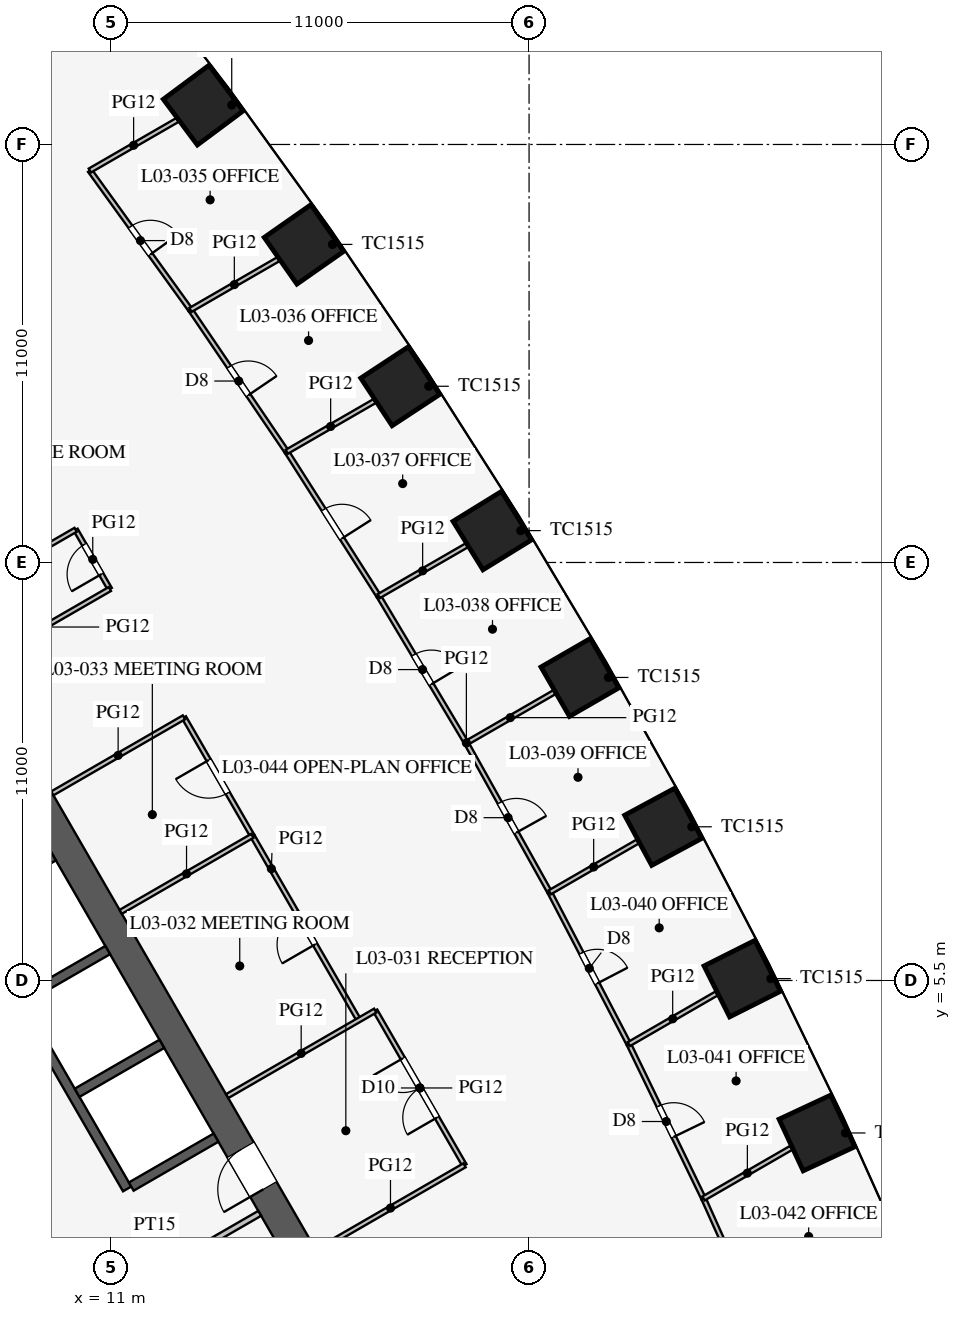
"""IFC4 building model, lengths in metres.
Left out: names, types, materials, properties, quantities, classifications, styles, units other than length and angle.
Written with IfcOpenShell. Run it as: python <this file> out.ifc"""

import sys

from ifc_helpers import new_model, si_unit, direction, frame, frame_2d, origin, origin_2d, place, context, subcontext, project, spatial, rectangle, extrude, element, fill, save


model = new_model("IFC4")
c1 = context("Model", 3, precision=1e-05, world=origin(), true_north=direction((0.0, 1.0)))
c2 = subcontext(c1, "Body", "Model", "MODEL_VIEW")
j1 = project(units=[si_unit("LENGTHUNIT", "METRE"), si_unit("PLANEANGLEUNIT", "RADIAN")], contexts=[c1])
p1 = place(None, origin())
s1 = spatial("IfcSite", under=j1, at=p1, CompositionType="ELEMENT")
p2 = place(p1, origin())
s2 = spatial("IfcBuilding", under=s1, at=p2, CompositionType="ELEMENT")
p3 = place(p2, frame((0.0, 0.0, 16.5)))
s3 = spatial("IfcBuildingStorey", under=s2, at=p3, CompositionType="ELEMENT", Elevation=16.5)
for number, where, z_axis, x_axis in (
    (1, (29.576, 1.487, 0.0), (0.0, 0.0, 1.0), (-0.423, 0.906, 0.0)),
    (2, (27.611, 5.549, 0.0), (0.0, 0.0, 1.0), (-0.449, 0.894, 0.0)),
    (3, (25.531, 9.544, 0.0), (0.0, 0.0, 1.0), (-0.475, 0.88, 0.0)),
    (4, (23.338, 13.474, 0.0), (0.0, 0.0, 1.0), (-0.5, 0.866, 0.0)),
    (5, (21.031, 17.339, 0.0), (0.0, 0.0, 1.0), (-0.525, 0.851, 0.0)),
    (6, (18.611, 21.137, 0.0), (0.0, 0.0, 1.0), (-0.549, 0.836, 0.0)),
    (7, (16.076, 24.87, 0.0), (0.0, 0.0, 1.0), (-0.574, 0.819, 0.0)),
    (8, (13.426, 28.536, 0.0), (0.0, 0.0, 1.0), (-0.597, 0.802, 0.0)),
):
    element("IfcColumn", number, at=place(p3, frame(where, z_axis=z_axis, x_axis=x_axis)), inside=s3, PredefinedType="COLUMN", context=c2, shape_type="SweptSolid", body=[
        extrude(rectangle(XDim=1.5, YDim=1.5, at=origin_2d()), origin(), (0.0, 0.0, 1.0), 4.2),
    ])
p4 = place(p3, frame((16.743, -3.0, 0.0), z_axis=(0.0, 0.0, 1.0), x_axis=(-0.500002442456, 0.866023993627, 0.0)))
e9 = element("IfcWall", 9, at=p4, inside=s3, PredefinedType="SHEAR", context=c2, shape_type="SweptSolid", body=[
    extrude(rectangle(XDim=21.939, YDim=0.8, at=frame_2d((10.97, 0.0))), origin(), (0.0, 0.0, 1.0), 4.2),
])
p5 = place(p4, frame((17.27, 0.0, 0.0)))
e10 = element("IfcOpeningElement", 10, at=p5, cuts=e9, PredefinedType="OPENING", context=c2, shape_type="SweptSolid", body=[
    extrude(rectangle(XDim=1.2, YDim=2.1, at=frame_2d((0.6, 1.05))), frame((0.0, 0.41, 0.0), z_axis=(0.0, -1.0, 0.0), x_axis=(1.0, 0.0, 0.0)), (0.0, 0.0, 1.0), 0.82),
])
p6 = place(p4, frame((3.47, 0.0, 0.0)))
e11 = element("IfcOpeningElement", 11, at=p6, cuts=e9, PredefinedType="OPENING", context=c2, shape_type="SweptSolid", body=[
    extrude(rectangle(XDim=1.2, YDim=2.1, at=frame_2d((0.6, 1.05))), frame((0.0, 0.41, 0.0), z_axis=(0.0, -1.0, 0.0), x_axis=(1.0, 0.0, 0.0)), (0.0, 0.0, 1.0), 0.82),
])
p7 = place(p3, frame((11.424, 0.014, 0.0), z_axis=(0.0, 0.0, 1.0), x_axis=(-0.500001763848, 0.866024385424, 0.0)))
e12 = element("IfcWall", 12, at=p7, inside=s3, PredefinedType="SHEAR", context=c2, shape_type="SweptSolid", body=[
    extrude(rectangle(XDim=11.4, YDim=0.25, at=frame_2d((5.7, 0.0))), origin(), (0.0, 0.0, 1.0), 4.2),
])
for number, where, z_axis, x_axis in (
    (13, (11.532, 0.076, 0.0), (0.0, 0.0, 1.0), (0.866, 0.5, 0.0)),
    (14, (10.107, 2.544, 0.0), (0.0, 0.0, 1.0), (0.866, 0.5, 0.0)),
    (15, (8.682, 5.012, 0.0), (0.0, 0.0, 1.0), (0.866, 0.5, 0.0)),
    (16, (7.257, 7.481, 0.0), (0.0, 0.0, 1.0), (0.866, 0.5, 0.0)),
):
    element("IfcWall", number, at=place(p3, frame(where, z_axis=z_axis, x_axis=x_axis)), inside=s3, PredefinedType="SHEAR", context=c2, shape_type="SweptSolid", body=[
        extrude(rectangle(XDim=2.575, YDim=0.25, at=frame_2d((1.288, 0.0))), origin(), (0.0, 0.0, 1.0), 4.2),
    ])
p8 = place(p3, frame((10.495, -3.178, 0.0), z_axis=(0.0, 0.0, 1.0), x_axis=(0.86602216432, 0.500005610874, 0.0)))
e17 = element("IfcWall", 17, at=p8, inside=s3, PredefinedType="PARTITIONING", context=c2, shape_type="SweptSolid", body=[
    extrude(rectangle(XDim=5.1, YDim=0.15, at=frame_2d((2.55, 0.0))), origin(), (0.0, 0.0, 1.0), 4.0),
])
p9 = place(p8, frame((2.6, 0.0, 0.0)))
e18 = element("IfcOpeningElement", 18, at=p9, cuts=e17, PredefinedType="OPENING", context=c2, shape_type="SweptSolid", body=[
    extrude(rectangle(XDim=0.9, YDim=2.1, at=frame_2d((0.45, 1.05))), frame((0.0, 0.085, 0.0), z_axis=(0.0, -1.0, 0.0), x_axis=(1.0, 0.0, 0.0)), (0.0, 0.0, 1.0), 0.17),
])
p10 = place(p3, frame((14.719, 9.306, 0.0), z_axis=(0.0, 0.0, 1.0), x_axis=(-0.499961193289, 0.866047807691, 0.0)))
e19 = element("IfcWall", 19, at=p10, inside=s3, PredefinedType="PARTITIONING", context=c2, shape_type="SweptSolid", body=[
    extrude(rectangle(XDim=3.6, YDim=0.12, at=frame_2d((1.8, 0.0))), origin(), (0.0, 0.0, 1.0), 2.9),
])
p11 = place(p10, frame((1.3, 0.0, 0.15)))
e20 = element("IfcOpeningElement", 20, at=p11, cuts=e19, PredefinedType="OPENING", context=c2, shape_type="SweptSolid", body=[
    extrude(rectangle(XDim=1.0, YDim=2.1, at=frame_2d((0.5, 1.05))), frame((0.0, 0.07, 0.0), z_axis=(0.0, -1.0, 0.0), x_axis=(1.0, 0.0, 0.0)), (0.0, 0.0, 1.0), 0.14),
])
p12 = place(p3, frame((10.969, 15.802, 0.0), z_axis=(0.0, 0.0, 1.0), x_axis=(-0.499961193289, 0.866047807691, 0.0)))
e21 = element("IfcWall", 21, at=p12, inside=s3, PredefinedType="PARTITIONING", context=c2, shape_type="SweptSolid", body=[
    extrude(rectangle(XDim=1.8, YDim=0.12, at=frame_2d((0.9, 0.0))), origin(), (0.0, 0.0, 1.0), 2.9),
])
p13 = place(p12, frame((0.45, 0.0, 0.15)))
e22 = element("IfcOpeningElement", 22, at=p13, cuts=e21, PredefinedType="OPENING", context=c2, shape_type="SweptSolid", body=[
    extrude(rectangle(XDim=0.9, YDim=2.1, at=frame_2d((0.45, 1.05))), frame((0.0, 0.07, 0.0), z_axis=(0.0, -1.0, 0.0), x_axis=(1.0, 0.0, 0.0)), (0.0, 0.0, 1.0), 0.14),
])
p14 = place(p3, frame((17.519, 4.457, 0.0), z_axis=(0.0, 0.0, 1.0), x_axis=(-0.500016814911, 0.866015695474, 0.0)))
e23 = element("IfcWall", 23, at=p14, inside=s3, PredefinedType="PARTITIONING", context=c2, shape_type="SweptSolid", body=[
    extrude(rectangle(XDim=5.6, YDim=0.12, at=frame_2d((2.8, 0.0))), origin(), (0.0, 0.0, 1.0), 2.9),
])
p15 = place(p14, frame((2.3, 0.0, 0.15)))
e24 = element("IfcOpeningElement", 24, at=p15, cuts=e23, PredefinedType="OPENING", context=c2, shape_type="SweptSolid", body=[
    extrude(rectangle(XDim=1.0, YDim=2.1, at=frame_2d((0.5, 1.05))), frame((0.0, 0.07, 0.0), z_axis=(0.0, -1.0, 0.0), x_axis=(1.0, 0.0, 0.0)), (0.0, 0.0, 1.0), 0.14),
])
p16 = place(p3, frame((20.302, 0.636, 0.0), z_axis=(0.0, 0.0, 1.0), x_axis=(-0.499977259774, 0.866038532462, 0.0)))
e25 = element("IfcWall", 25, at=p16, inside=s3, PredefinedType="PARTITIONING", context=c2, shape_type="SweptSolid", body=[
    extrude(rectangle(XDim=4.7, YDim=0.12, at=frame_2d((2.35, 0.0))), origin(), (0.0, 0.0, 1.0), 2.9),
])
p17 = place(p16, frame((1.45, 0.0, 0.15)))
e26 = element("IfcOpeningElement", 26, at=p17, cuts=e25, PredefinedType="OPENING", context=c2, shape_type="SweptSolid", body=[
    extrude(rectangle(XDim=1.8, YDim=2.1, at=frame_2d((0.9, 1.05))), frame((0.0, 0.07, 0.0), z_axis=(0.0, -1.0, 0.0), x_axis=(1.0, 0.0, 0.0)), (0.0, 0.0, 1.0), 0.14),
])
for number, where, z_axis, x_axis in (
    (27, (11.255, 7.306, 0.0), (0.0, 0.0, 1.0), (0.866, 0.5, 0.0)),
    (28, (6.605, 15.36, 0.0), (0.0, 0.0, 1.0), (0.866, 0.5, 0.0)),
    (29, (9.455, 10.424, 0.0), (0.0, 0.0, 1.0), (0.866, 0.5, 0.0)),
    (30, (7.505, 13.802, 0.0), (0.0, 0.0, 1.0), (0.866, 0.5, 0.0)),
):
    element("IfcWall", number, at=place(p3, frame(where, z_axis=z_axis, x_axis=x_axis)), inside=s3, PredefinedType="PARTITIONING", context=c2, shape_type="SweptSolid", body=[
        extrude(rectangle(XDim=4.0, YDim=0.12, at=frame_2d((2.0, 0.0))), origin(), (0.0, 0.0, 1.0), 2.9),
    ])
p18 = place(p3, frame((14.055, 2.457, 0.0), z_axis=(0.0, 0.0, 1.0), x_axis=(0.866031096941, 0.499990139034, 0.0)))
e31 = element("IfcWall", 31, at=p18, inside=s3, PredefinedType="PARTITIONING", context=c2, shape_type="SweptSolid", body=[
    extrude(rectangle(XDim=4.5, YDim=0.12, at=frame_2d((2.25, 0.0))), origin(), (0.0, 0.0, 1.0), 2.9),
])
p19 = place(p3, frame((16.405, -1.614, 0.0), z_axis=(0.0, 0.0, 1.0), x_axis=(0.866017533419, 0.500013631625, 0.0)))
e32 = element("IfcWall", 32, at=p19, inside=s3, PredefinedType="PARTITIONING", context=c2, shape_type="SweptSolid", body=[
    extrude(rectangle(XDim=4.5, YDim=0.12, at=frame_2d((2.25, 0.0))), origin(), (0.0, 0.0, 1.0), 2.9),
])
p20 = place(p3, frame((20.351, 11.749, 0.0), z_axis=(0.0, 0.0, 1.0), x_axis=(-0.51252396108, 0.858672923364, 0.0)))
e33 = element("IfcWall", 33, at=p20, inside=s3, PredefinedType="PARTITIONING", context=c2, shape_type="SweptSolid", body=[
    extrude(rectangle(XDim=4.5, YDim=0.12, at=frame_2d((2.25, 0.0))), origin(), (0.0, 0.0, 1.0), 2.9),
])
p21 = place(p20, frame((1.8, 0.0, 0.15)))
e34 = element("IfcOpeningElement", 34, at=p21, cuts=e33, PredefinedType="OPENING", context=c2, shape_type="SweptSolid", body=[
    extrude(rectangle(XDim=0.9, YDim=2.1, at=frame_2d((0.45, 1.05))), frame((0.0, 0.07, 0.0), z_axis=(0.0, -1.0, 0.0), x_axis=(1.0, 0.0, 0.0)), (0.0, 0.0, 1.0), 0.14),
])
p22 = place(p3, frame((13.091, 23.146, 0.0), z_axis=(0.0, 0.0, 1.0), x_axis=(-0.58534077607, 0.810787380187, 0.0)))
e35 = element("IfcWall", 35, at=p22, inside=s3, PredefinedType="PARTITIONING", context=c2, shape_type="SweptSolid", body=[
    extrude(rectangle(XDim=4.523, YDim=0.12, at=frame_2d((2.262, 0.0))), origin(), (0.0, 0.0, 1.0), 2.9),
])
p23 = place(p22, frame((1.8, 0.0, 0.15)))
e36 = element("IfcOpeningElement", 36, at=p23, cuts=e35, PredefinedType="OPENING", context=c2, shape_type="SweptSolid", body=[
    extrude(rectangle(XDim=0.9, YDim=2.1, at=frame_2d((0.45, 1.05))), frame((0.0, 0.07, 0.0), z_axis=(0.0, -1.0, 0.0), x_axis=(1.0, 0.0, 0.0)), (0.0, 0.0, 1.0), 0.14),
])
p24 = place(p3, frame((18.044, 15.614, 0.0), z_axis=(0.0, 0.0, 1.0), x_axis=(-0.537243691336, 0.843427066272, 0.0)))
e37 = element("IfcWall", 37, at=p24, inside=s3, PredefinedType="PARTITIONING", context=c2, shape_type="SweptSolid", body=[
    extrude(rectangle(XDim=4.504, YDim=0.12, at=frame_2d((2.252, 0.0))), origin(), (0.0, 0.0, 1.0), 2.9),
])
p25 = place(p24, frame((1.8, 0.0, 0.15)))
e38 = element("IfcOpeningElement", 38, at=p25, cuts=e37, PredefinedType="OPENING", context=c2, shape_type="SweptSolid", body=[
    extrude(rectangle(XDim=0.9, YDim=2.1, at=frame_2d((0.45, 1.05))), frame((0.0, 0.07, 0.0), z_axis=(0.0, -1.0, 0.0), x_axis=(1.0, 0.0, 0.0)), (0.0, 0.0, 1.0), 0.14),
])
p26 = place(p3, frame((15.624, 19.413, 0.0), z_axis=(0.0, 0.0, 1.0), x_axis=(-0.561512004239, 0.827468591002, 0.0)))
e39 = element("IfcWall", 39, at=p26, inside=s3, PredefinedType="PARTITIONING", context=c2, shape_type="SweptSolid", body=[
    extrude(rectangle(XDim=4.512, YDim=0.12, at=frame_2d((2.256, 0.0))), origin(), (0.0, 0.0, 1.0), 2.9),
])
p27 = place(p26, frame((1.8, 0.0, 0.15)))
e40 = element("IfcOpeningElement", 40, at=p27, cuts=e39, PredefinedType="OPENING", context=c2, shape_type="SweptSolid", body=[
    extrude(rectangle(XDim=0.9, YDim=2.1, at=frame_2d((0.45, 1.05))), frame((0.0, 0.07, 0.0), z_axis=(0.0, -1.0, 0.0), x_axis=(1.0, 0.0, 0.0)), (0.0, 0.0, 1.0), 0.14),
])
p28 = place(p3, frame((26.591, -0.236, 0.0), z_axis=(0.0, 0.0, 1.0), x_axis=(-0.435857917556, 0.900015486369, 0.0)))
e41 = element("IfcWall", 41, at=p28, inside=s3, PredefinedType="PARTITIONING", context=c2, shape_type="SweptSolid", body=[
    extrude(rectangle(XDim=4.512, YDim=0.12, at=frame_2d((2.256, 0.0))), origin(), (0.0, 0.0, 1.0), 2.9),
])
p29 = place(p28, frame((1.8, 0.0, 0.15)))
e42 = element("IfcOpeningElement", 42, at=p29, cuts=e41, PredefinedType="OPENING", context=c2, shape_type="SweptSolid", body=[
    extrude(rectangle(XDim=0.9, YDim=2.1, at=frame_2d((0.45, 1.05))), frame((0.0, 0.07, 0.0), z_axis=(0.0, -1.0, 0.0), x_axis=(1.0, 0.0, 0.0)), (0.0, 0.0, 1.0), 0.14),
])
p30 = place(p3, frame((28.443, -4.363, 0.0), z_axis=(0.0, 0.0, 1.0), x_axis=(-0.409495979977, 0.912311921649, 0.0)))
e43 = element("IfcWall", 43, at=p30, inside=s3, PredefinedType="PARTITIONING", context=c2, shape_type="SweptSolid", body=[
    extrude(rectangle(XDim=4.523, YDim=0.12, at=frame_2d((2.262, 0.0))), origin(), (0.0, 0.0, 1.0), 2.9),
])
p31 = place(p30, frame((1.8, 0.0, 0.15)))
e44 = element("IfcOpeningElement", 44, at=p31, cuts=e43, PredefinedType="OPENING", context=c2, shape_type="SweptSolid", body=[
    extrude(rectangle(XDim=0.9, YDim=2.1, at=frame_2d((0.45, 1.05))), frame((0.0, 0.07, 0.0), z_axis=(0.0, -1.0, 0.0), x_axis=(1.0, 0.0, 0.0)), (0.0, 0.0, 1.0), 0.14),
])
p32 = place(p3, frame((22.544, 7.82, 0.0), z_axis=(0.0, 0.0, 1.0), x_axis=(-0.487373854787, 0.873193406795, 0.0)))
e45 = element("IfcWall", 45, at=p32, inside=s3, PredefinedType="PARTITIONING", context=c2, shape_type="SweptSolid", body=[
    extrude(rectangle(XDim=4.5, YDim=0.12, at=frame_2d((2.25, 0.0))), origin(), (0.0, 0.0, 1.0), 2.9),
])
p33 = place(p32, frame((1.8, 0.0, 0.15)))
e46 = element("IfcOpeningElement", 46, at=p33, cuts=e45, PredefinedType="OPENING", context=c2, shape_type="SweptSolid", body=[
    extrude(rectangle(XDim=0.9, YDim=2.1, at=frame_2d((0.45, 1.05))), frame((0.0, 0.07, 0.0), z_axis=(0.0, -1.0, 0.0), x_axis=(1.0, 0.0, 0.0)), (0.0, 0.0, 1.0), 0.14),
])
p34 = place(p3, frame((24.624, 3.824, 0.0), z_axis=(0.0, 0.0, 1.0), x_axis=(-0.461810056307, 0.886978845235, 0.0)))
e47 = element("IfcWall", 47, at=p34, inside=s3, PredefinedType="PARTITIONING", context=c2, shape_type="SweptSolid", body=[
    extrude(rectangle(XDim=4.504, YDim=0.12, at=frame_2d((2.252, 0.0))), origin(), (0.0, 0.0, 1.0), 2.9),
])
p35 = place(p34, frame((1.8, 0.0, 0.15)))
e48 = element("IfcOpeningElement", 48, at=p35, cuts=e47, PredefinedType="OPENING", context=c2, shape_type="SweptSolid", body=[
    extrude(rectangle(XDim=0.9, YDim=2.1, at=frame_2d((0.45, 1.05))), frame((0.0, 0.07, 0.0), z_axis=(0.0, -1.0, 0.0), x_axis=(1.0, 0.0, 0.0)), (0.0, 0.0, 1.0), 0.14),
])
p36 = place(p3, frame((20.351, 11.749, 0.0), z_axis=(0.0, 0.0, 1.0), x_axis=(0.865989150234, 0.500062787734, 0.0)))
e49 = element("IfcWall", 49, at=p36, inside=s3, PredefinedType="PARTITIONING", context=c2, shape_type="SweptSolid", body=[
    extrude(rectangle(XDim=2.67, YDim=0.12, at=frame_2d((1.335, 0.0))), origin(), (0.0, 0.0, 1.0), 2.9),
])
p37 = place(p3, frame((13.091, 23.146, 0.0), z_axis=(0.0, 0.0, 1.0), x_axis=(0.866023818221, 0.500002746266, 0.0)))
e50 = element("IfcWall", 50, at=p37, inside=s3, PredefinedType="PARTITIONING", context=c2, shape_type="SweptSolid", body=[
    extrude(rectangle(XDim=2.664, YDim=0.12, at=frame_2d((1.332, 0.0))), origin(), (0.0, 0.0, 1.0), 2.9),
])
p38 = place(p3, frame((10.443, 26.814, 0.0), z_axis=(0.0, 0.0, 1.0), x_axis=(0.866031171652, 0.499990009627, 0.0)))
e51 = element("IfcWall", 51, at=p38, inside=s3, PredefinedType="PARTITIONING", context=c2, shape_type="SweptSolid", body=[
    extrude(rectangle(XDim=2.659, YDim=0.12, at=frame_2d((1.33, 0.0))), origin(), (0.0, 0.0, 1.0), 2.9),
])
p39 = place(p3, frame((18.044, 15.614, 0.0), z_axis=(0.0, 0.0, 1.0), x_axis=(0.866022619654, 0.500004822225, 0.0)))
e52 = element("IfcWall", 52, at=p39, inside=s3, PredefinedType="PARTITIONING", context=c2, shape_type="SweptSolid", body=[
    extrude(rectangle(XDim=2.669, YDim=0.12, at=frame_2d((1.335, 0.0))), origin(), (0.0, 0.0, 1.0), 2.9),
])
p40 = place(p3, frame((15.624, 19.413, 0.0), z_axis=(0.0, 0.0, 1.0), x_axis=(0.866020974757, 0.500007671222, 0.0)))
e53 = element("IfcWall", 53, at=p40, inside=s3, PredefinedType="PARTITIONING", context=c2, shape_type="SweptSolid", body=[
    extrude(rectangle(XDim=2.667, YDim=0.12, at=frame_2d((1.334, 0.0))), origin(), (0.0, 0.0, 1.0), 2.9),
])
p41 = place(p3, frame((26.591, -0.236, 0.0), z_axis=(0.0, 0.0, 1.0), x_axis=(0.866023818221, 0.500002746266, 0.0)))
e54 = element("IfcWall", 54, at=p41, inside=s3, PredefinedType="PARTITIONING", context=c2, shape_type="SweptSolid", body=[
    extrude(rectangle(XDim=2.664, YDim=0.12, at=frame_2d((1.332, 0.0))), origin(), (0.0, 0.0, 1.0), 2.9),
])
p42 = place(p3, frame((22.544, 7.82, 0.0), z_axis=(0.0, 0.0, 1.0), x_axis=(0.866022619654, 0.500004822225, 0.0)))
e55 = element("IfcWall", 55, at=p42, inside=s3, PredefinedType="PARTITIONING", context=c2, shape_type="SweptSolid", body=[
    extrude(rectangle(XDim=2.669, YDim=0.12, at=frame_2d((1.335, 0.0))), origin(), (0.0, 0.0, 1.0), 2.9),
])
p43 = place(p3, frame((24.624, 3.824, 0.0), z_axis=(0.0, 0.0, 1.0), x_axis=(0.866020974757, 0.500007671222, 0.0)))
e56 = element("IfcWall", 56, at=p43, inside=s3, PredefinedType="PARTITIONING", context=c2, shape_type="SweptSolid", body=[
    extrude(rectangle(XDim=2.667, YDim=0.12, at=frame_2d((1.334, 0.0))), origin(), (0.0, 0.0, 1.0), 2.9),
])
p44 = place(p6, origin())
e57 = element("IfcDoor", 57, at=p44, inside=s3, OperationType="SINGLE_SWING_LEFT", PredefinedType="DOOR", context=c2, shape_type="SweptSolid", body=[
    extrude(rectangle(XDim=1.2, YDim=2.1, at=frame_2d((0.6, 1.05))), frame((0.0, 0.025, 0.0), z_axis=(0.0, -1.0, 0.0), x_axis=(1.0, 0.0, 0.0)), (0.0, 0.0, 1.0), 0.05),
])
fill(e11, e57)
p45 = place(p17, origin())
e58 = element("IfcDoor", 58, at=p45, inside=s3, OperationType="DOUBLE_DOOR_SINGLE_SWING", PredefinedType="DOOR", context=c2, shape_type="SweptSolid", body=[
    extrude(rectangle(XDim=1.8, YDim=2.1, at=frame_2d((0.9, 1.05))), frame((0.0, 0.025, 0.0), z_axis=(0.0, -1.0, 0.0), x_axis=(1.0, 0.0, 0.0)), (0.0, 0.0, 1.0), 0.05),
])
fill(e26, e58)
p46 = place(p15, origin())
e59 = element("IfcDoor", 59, at=p46, inside=s3, OperationType="SINGLE_SWING_LEFT", PredefinedType="DOOR", context=c2, shape_type="SweptSolid", body=[
    extrude(rectangle(XDim=1.0, YDim=2.1, at=frame_2d((0.5, 1.05))), frame((0.0, 0.025, 0.0), z_axis=(0.0, -1.0, 0.0), x_axis=(1.0, 0.0, 0.0)), (0.0, 0.0, 1.0), 0.05),
])
fill(e24, e59)
p47 = place(p11, origin())
e60 = element("IfcDoor", 60, at=p47, inside=s3, OperationType="SINGLE_SWING_RIGHT", PredefinedType="DOOR", context=c2, shape_type="SweptSolid", body=[
    extrude(rectangle(XDim=1.0, YDim=2.1, at=frame_2d((0.5, 1.05))), frame((0.0, 0.025, 0.0), z_axis=(0.0, -1.0, 0.0), x_axis=(1.0, 0.0, 0.0)), (0.0, 0.0, 1.0), 0.05),
])
fill(e20, e60)
p48 = place(p13, origin())
e61 = element("IfcDoor", 61, at=p48, inside=s3, OperationType="SINGLE_SWING_LEFT", PredefinedType="DOOR", context=c2, shape_type="SweptSolid", body=[
    extrude(rectangle(XDim=0.9, YDim=2.1, at=frame_2d((0.45, 1.05))), frame((0.0, 0.025, 0.0), z_axis=(0.0, -1.0, 0.0), x_axis=(1.0, 0.0, 0.0)), (0.0, 0.0, 1.0), 0.05),
])
fill(e22, e61)
p49 = place(p23, frame((0.9, 0.0, 0.0), z_axis=(0.0, 0.0, 1.0), x_axis=(-1.0, 0.0, 0.0)))
e62 = element("IfcDoor", 62, at=p49, inside=s3, OperationType="SINGLE_SWING_RIGHT", PredefinedType="DOOR", context=c2, shape_type="SweptSolid", body=[
    extrude(rectangle(XDim=0.9, YDim=2.1, at=frame_2d((0.45, 1.05))), frame((0.0, 0.025, 0.0), z_axis=(0.0, -1.0, 0.0), x_axis=(1.0, 0.0, 0.0)), (0.0, 0.0, 1.0), 0.05),
])
fill(e36, e62)
p50 = place(p27, frame((0.9, 0.0, 0.0), z_axis=(0.0, 0.0, 1.0), x_axis=(-1.0, 0.0, 0.0)))
e63 = element("IfcDoor", 63, at=p50, inside=s3, OperationType="SINGLE_SWING_RIGHT", PredefinedType="DOOR", context=c2, shape_type="SweptSolid", body=[
    extrude(rectangle(XDim=0.9, YDim=2.1, at=frame_2d((0.45, 1.05))), frame((0.0, 0.025, 0.0), z_axis=(0.0, -1.0, 0.0), x_axis=(1.0, 0.0, 0.0)), (0.0, 0.0, 1.0), 0.05),
])
fill(e40, e63)
p51 = place(p25, frame((0.9, 0.0, 0.0), z_axis=(0.0, 0.0, 1.0), x_axis=(-1.0, 0.0, 0.0)))
e64 = element("IfcDoor", 64, at=p51, inside=s3, OperationType="SINGLE_SWING_RIGHT", PredefinedType="DOOR", context=c2, shape_type="SweptSolid", body=[
    extrude(rectangle(XDim=0.9, YDim=2.1, at=frame_2d((0.45, 1.05))), frame((0.0, 0.025, 0.0), z_axis=(0.0, -1.0, 0.0), x_axis=(1.0, 0.0, 0.0)), (0.0, 0.0, 1.0), 0.05),
])
fill(e38, e64)
p52 = place(p21, frame((0.9, 0.0, 0.0), z_axis=(0.0, 0.0, 1.0), x_axis=(-1.0, 0.0, 0.0)))
e65 = element("IfcDoor", 65, at=p52, inside=s3, OperationType="SINGLE_SWING_RIGHT", PredefinedType="DOOR", context=c2, shape_type="SweptSolid", body=[
    extrude(rectangle(XDim=0.9, YDim=2.1, at=frame_2d((0.45, 1.05))), frame((0.0, 0.025, 0.0), z_axis=(0.0, -1.0, 0.0), x_axis=(1.0, 0.0, 0.0)), (0.0, 0.0, 1.0), 0.05),
])
fill(e34, e65)
p53 = place(p33, frame((0.9, 0.0, 0.0), z_axis=(0.0, 0.0, 1.0), x_axis=(-1.0, 0.0, 0.0)))
e66 = element("IfcDoor", 66, at=p53, inside=s3, OperationType="SINGLE_SWING_RIGHT", PredefinedType="DOOR", context=c2, shape_type="SweptSolid", body=[
    extrude(rectangle(XDim=0.9, YDim=2.1, at=frame_2d((0.45, 1.05))), frame((0.0, 0.025, 0.0), z_axis=(0.0, -1.0, 0.0), x_axis=(1.0, 0.0, 0.0)), (0.0, 0.0, 1.0), 0.05),
])
fill(e46, e66)
p54 = place(p35, frame((0.9, 0.0, 0.0), z_axis=(0.0, 0.0, 1.0), x_axis=(-1.0, 0.0, 0.0)))
e67 = element("IfcDoor", 67, at=p54, inside=s3, OperationType="SINGLE_SWING_RIGHT", PredefinedType="DOOR", context=c2, shape_type="SweptSolid", body=[
    extrude(rectangle(XDim=0.9, YDim=2.1, at=frame_2d((0.45, 1.05))), frame((0.0, 0.025, 0.0), z_axis=(0.0, -1.0, 0.0), x_axis=(1.0, 0.0, 0.0)), (0.0, 0.0, 1.0), 0.05),
])
fill(e48, e67)
p55 = place(p29, frame((0.9, 0.0, 0.0), z_axis=(0.0, 0.0, 1.0), x_axis=(-1.0, 0.0, 0.0)))
e68 = element("IfcDoor", 68, at=p55, inside=s3, OperationType="SINGLE_SWING_RIGHT", PredefinedType="DOOR", context=c2, shape_type="SweptSolid", body=[
    extrude(rectangle(XDim=0.9, YDim=2.1, at=frame_2d((0.45, 1.05))), frame((0.0, 0.025, 0.0), z_axis=(0.0, -1.0, 0.0), x_axis=(1.0, 0.0, 0.0)), (0.0, 0.0, 1.0), 0.05),
])
fill(e42, e68)
save(model, sys.argv[1])
